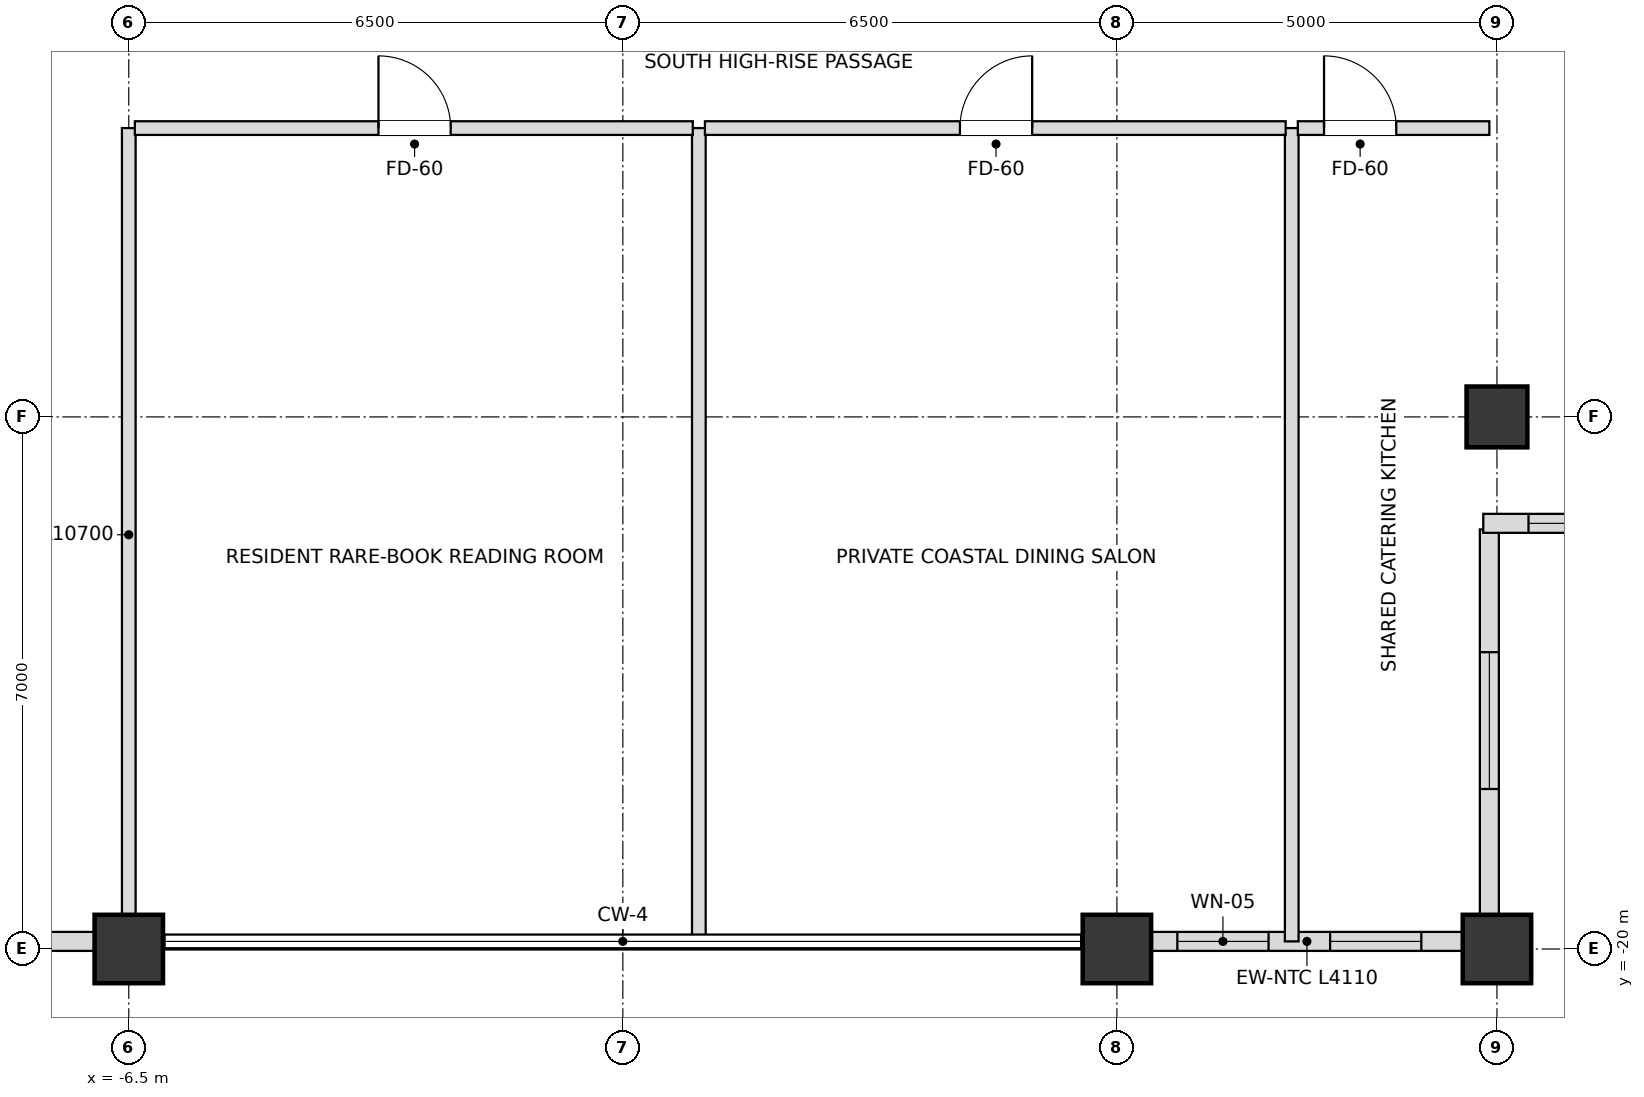
"""IFC4 building model, lengths in metres.
Left out: names, types, materials, properties, quantities, classifications, styles, units other than length and angle.
Written with IfcOpenShell. Run it as: python <this file> out.ifc"""

import sys

from ifc_helpers import new_model, si_unit, direction, frame, frame_2d, origin, origin_2d, place, context, subcontext, project, spatial, rectangle, extrude, element, fill, save


model = new_model("IFC4")
c1 = context("Model", 3, precision=1e-05, world=origin(), true_north=direction((0.0, 1.0)))
c2 = subcontext(c1, "Body", "Model", "MODEL_VIEW")
j1 = project(units=[si_unit("LENGTHUNIT", "METRE"), si_unit("PLANEANGLEUNIT", "RADIAN")], contexts=[c1])
p1 = place(None, origin())
s1 = spatial("IfcSite", under=j1, at=p1, CompositionType="ELEMENT")
p2 = place(p1, origin())
s2 = spatial("IfcBuilding", under=s1, at=p2, CompositionType="ELEMENT")
p3 = place(p2, frame((0.0, 0.0, 269.1)))
s3 = spatial("IfcBuildingStorey", under=s2, at=p3, CompositionType="ELEMENT", Elevation=269.1)
for number, where, z_axis, x_axis in (
    (1, (-6.5, -20.0, 0.0), (0.0, 0.0, 1.0), (1.0, 0.0, 0.0)),
    (2, (6.5, -20.0, 0.0), (0.0, 0.0, 1.0), (1.0, 0.0, 0.0)),
    (3, (11.5, -20.0, 0.0), (0.0, 0.0, 1.0), (1.0, 0.0, 0.0)),
):
    element("IfcColumn", number, at=place(p3, frame(where, z_axis=z_axis, x_axis=x_axis)), inside=s3, PredefinedType="USERDEFINED", context=c2, shape_type="SweptSolid", body=[
        extrude(rectangle(XDim=0.9, YDim=0.9, at=origin_2d()), origin(), (0.0, 0.0, 1.0), 3.6),
    ])
p4 = place(p3, frame((11.5, -13.0, 0.0), z_axis=(0.0, 0.0, 1.0), x_axis=(1.0, 0.0, 0.0)))
e4 = element("IfcColumn", 4, at=p4, inside=s3, PredefinedType="COLUMN", context=c2, shape_type="SweptSolid", body=[
    extrude(rectangle(XDim=0.8, YDim=0.8, at=origin_2d()), origin(), (0.0, 0.0, 1.0), 3.6),
])
p5 = place(p3, frame((-11.055, -19.9, 0.0), z_axis=(0.0, 0.0, 1.0), x_axis=(1.0, 0.0, 0.0)))
e5 = element("IfcWall", 5, at=p5, inside=s3, PredefinedType="SOLIDWALL", context=c2, shape_type="SweptSolid", body=[
    extrude(rectangle(XDim=4.11, YDim=0.25, at=frame_2d((2.055, 0.0))), origin(), (0.0, 0.0, 1.0), 2.748),
])
p6 = place(p5, frame((1.155, 0.0, 0.72)))
e6 = element("IfcOpeningElement", 6, at=p6, cuts=e5, PredefinedType="OPENING", context=c2, shape_type="SweptSolid", body=[
    extrude(rectangle(XDim=1.8, YDim=1.68, at=frame_2d((0.9, 0.84))), frame((0.0, 0.135, 0.0), z_axis=(0.0, -1.0, 0.0), x_axis=(1.0, 0.0, 0.0)), (0.0, 0.0, 1.0), 0.27),
])
p7 = place(p3, frame((6.945, -19.9, 0.0), z_axis=(0.0, 0.0, 1.0), x_axis=(1.0, 0.0, 0.0)))
e7 = element("IfcWall", 7, at=p7, inside=s3, PredefinedType="SOLIDWALL", context=c2, shape_type="SweptSolid", body=[
    extrude(rectangle(XDim=4.11, YDim=0.25, at=frame_2d((2.055, 0.0))), origin(), (0.0, 0.0, 1.0), 2.748),
])
p8 = place(p7, frame((0.35, 0.0, 0.72)))
e8 = element("IfcOpeningElement", 8, at=p8, cuts=e7, PredefinedType="OPENING", context=c2, shape_type="SweptSolid", body=[
    extrude(rectangle(XDim=1.2, YDim=1.68, at=frame_2d((0.6, 0.84))), frame((0.0, 0.135, 0.0), z_axis=(0.0, -1.0, 0.0), x_axis=(1.0, 0.0, 0.0)), (0.0, 0.0, 1.0), 0.27),
])
p9 = place(p7, frame((2.36, 0.0, 0.72)))
e9 = element("IfcOpeningElement", 9, at=p9, cuts=e7, PredefinedType="OPENING", context=c2, shape_type="SweptSolid", body=[
    extrude(rectangle(XDim=1.2, YDim=1.68, at=frame_2d((0.6, 0.84))), frame((0.0, 0.135, 0.0), z_axis=(0.0, -1.0, 0.0), x_axis=(1.0, 0.0, 0.0)), (0.0, 0.0, 1.0), 0.27),
])
p10 = place(p3, frame((11.4, -19.82, 0.0), z_axis=(0.0, 0.0, 1.0), x_axis=(0.0, 1.0, 0.0)))
e10 = element("IfcWall", 10, at=p10, inside=s3, PredefinedType="SOLIDWALL", context=c2, shape_type="SweptSolid", body=[
    extrude(rectangle(XDim=5.34, YDim=0.25, at=frame_2d((2.67, 0.0))), origin(), (0.0, 0.0, 1.0), 2.748),
])
p11 = place(p10, frame((1.925, 0.0, 0.72)))
e11 = element("IfcOpeningElement", 11, at=p11, cuts=e10, PredefinedType="OPENING", context=c2, shape_type="SweptSolid", body=[
    extrude(rectangle(XDim=1.8, YDim=1.68, at=frame_2d((0.9, 0.84))), frame((0.0, 0.135, 0.0), z_axis=(0.0, -1.0, 0.0), x_axis=(1.0, 0.0, 0.0)), (0.0, 0.0, 1.0), 0.27),
])
p12 = place(p3, frame((11.32, -14.4, 0.0), z_axis=(0.0, 0.0, 1.0), x_axis=(1.0, 0.0, 0.0)))
e12 = element("IfcWall", 12, at=p12, inside=s3, PredefinedType="SOLIDWALL", context=c2, shape_type="SweptSolid", body=[
    extrude(rectangle(XDim=5.66, YDim=0.25, at=frame_2d((2.83, 0.0))), origin(), (0.0, 0.0, 1.0), 2.748),
])
p13 = place(p12, frame((0.595, 0.0, 0.72)))
e13 = element("IfcOpeningElement", 13, at=p13, cuts=e12, PredefinedType="OPENING", context=c2, shape_type="SweptSolid", body=[
    extrude(rectangle(XDim=1.8, YDim=1.68, at=frame_2d((0.9, 0.84))), frame((0.0, 0.135, 0.0), z_axis=(0.0, -1.0, 0.0), x_axis=(1.0, 0.0, 0.0)), (0.0, 0.0, 1.0), 0.27),
])
p14 = place(p12, frame((3.265, 0.0, 0.72)))
e14 = element("IfcOpeningElement", 14, at=p14, cuts=e12, PredefinedType="OPENING", context=c2, shape_type="SweptSolid", body=[
    extrude(rectangle(XDim=1.8, YDim=1.68, at=frame_2d((0.9, 0.84))), frame((0.0, 0.135, 0.0), z_axis=(0.0, -1.0, 0.0), x_axis=(1.0, 0.0, 0.0)), (0.0, 0.0, 1.0), 0.27),
])
p15 = place(p3, frame((-6.5, -19.9, 0.0), z_axis=(0.0, 0.0, 1.0), x_axis=(0.0, 1.0, 0.0)))
e15 = element("IfcWall", 15, at=p15, inside=s3, PredefinedType="PARTITIONING", context=c2, shape_type="SweptSolid", body=[
    extrude(rectangle(XDim=10.7, YDim=0.18, at=frame_2d((5.35, 0.0))), origin(), (0.0, 0.0, 1.0), 2.826),
])
p16 = place(p3, frame((1.0, -19.9, 0.0), z_axis=(0.0, 0.0, 1.0), x_axis=(0.0, 1.0, 0.0)))
e16 = element("IfcWall", 16, at=p16, inside=s3, PredefinedType="PARTITIONING", context=c2, shape_type="SweptSolid", body=[
    extrude(rectangle(XDim=10.7, YDim=0.18, at=frame_2d((5.35, 0.0))), origin(), (0.0, 0.0, 1.0), 3.018),
])
p17 = place(p3, frame((8.8, -19.9, 0.0), z_axis=(0.0, 0.0, 1.0), x_axis=(0.0, 1.0, 0.0)))
e17 = element("IfcWall", 17, at=p17, inside=s3, PredefinedType="PARTITIONING", context=c2, shape_type="SweptSolid", body=[
    extrude(rectangle(XDim=10.7, YDim=0.18, at=frame_2d((5.35, 0.0))), origin(), (0.0, 0.0, 1.0), 2.826),
])
p18 = place(p3, frame((-6.42, -9.2, 0.0), z_axis=(0.0, 0.0, 1.0), x_axis=(1.0, 0.0, 0.0)))
e18 = element("IfcWall", 18, at=p18, inside=s3, PredefinedType="PARTITIONING", context=c2, shape_type="SweptSolid", body=[
    extrude(rectangle(XDim=7.34, YDim=0.18, at=frame_2d((3.67, 0.0))), origin(), (0.0, 0.0, 1.0), 3.38),
])
p19 = place(p18, frame((3.205, 0.0, 0.0)))
e19 = element("IfcOpeningElement", 19, at=p19, cuts=e18, PredefinedType="OPENING", context=c2, shape_type="SweptSolid", body=[
    extrude(rectangle(XDim=0.95, YDim=2.15, at=frame_2d((0.475, 1.075))), frame((0.0, 0.1, 0.0), z_axis=(0.0, -1.0, 0.0), x_axis=(1.0, 0.0, 0.0)), (0.0, 0.0, 1.0), 0.2),
])
p20 = place(p3, frame((1.08, -9.2, 0.0), z_axis=(0.0, 0.0, 1.0), x_axis=(1.0, 0.0, 0.0)))
e20 = element("IfcWall", 20, at=p20, inside=s3, PredefinedType="PARTITIONING", context=c2, shape_type="SweptSolid", body=[
    extrude(rectangle(XDim=7.64, YDim=0.18, at=frame_2d((3.82, 0.0))), origin(), (0.0, 0.0, 1.0), 2.826),
])
p21 = place(p20, frame((3.355, 0.0, 0.0)))
e21 = element("IfcOpeningElement", 21, at=p21, cuts=e20, PredefinedType="OPENING", context=c2, shape_type="SweptSolid", body=[
    extrude(rectangle(XDim=0.95, YDim=2.15, at=frame_2d((0.475, 1.075))), frame((0.0, 0.1, 0.0), z_axis=(0.0, -1.0, 0.0), x_axis=(1.0, 0.0, 0.0)), (0.0, 0.0, 1.0), 0.2),
])
p22 = place(p3, frame((8.88, -9.2, 0.0), z_axis=(0.0, 0.0, 1.0), x_axis=(1.0, 0.0, 0.0)))
e22 = element("IfcWall", 22, at=p22, inside=s3, PredefinedType="PARTITIONING", context=c2, shape_type="SweptSolid", body=[
    extrude(rectangle(XDim=2.52, YDim=0.18, at=frame_2d((1.26, 0.0))), origin(), (0.0, 0.0, 1.0), 3.38),
])
p23 = place(p22, frame((0.345, 0.0, 0.0)))
e23 = element("IfcOpeningElement", 23, at=p23, cuts=e22, PredefinedType="OPENING", context=c2, shape_type="SweptSolid", body=[
    extrude(rectangle(XDim=0.95, YDim=2.15, at=frame_2d((0.475, 1.075))), frame((0.0, 0.1, 0.0), z_axis=(0.0, -1.0, 0.0), x_axis=(1.0, 0.0, 0.0)), (0.0, 0.0, 1.0), 0.2),
])
p24 = place(p8, origin())
e24 = element("IfcWindow", 24, at=p24, inside=s3, PartitioningType="SINGLE_PANEL", PredefinedType="WINDOW", context=c2, shape_type="SweptSolid", body=[
    extrude(rectangle(XDim=1.2, YDim=1.68, at=frame_2d((0.6, 0.84))), frame((0.0, 0.03, 0.0), z_axis=(0.0, -1.0, 0.0), x_axis=(1.0, 0.0, 0.0)), (0.0, 0.0, 1.0), 0.06),
])
fill(e8, e24)
p25 = place(p9, origin())
e25 = element("IfcWindow", 25, at=p25, inside=s3, PartitioningType="SINGLE_PANEL", PredefinedType="WINDOW", context=c2, shape_type="SweptSolid", body=[
    extrude(rectangle(XDim=1.2, YDim=1.68, at=frame_2d((0.6, 0.84))), frame((0.0, 0.03, 0.0), z_axis=(0.0, -1.0, 0.0), x_axis=(1.0, 0.0, 0.0)), (0.0, 0.0, 1.0), 0.06),
])
fill(e9, e25)
p26 = place(p11, origin())
e26 = element("IfcWindow", 26, at=p26, inside=s3, PartitioningType="SINGLE_PANEL", PredefinedType="WINDOW", context=c2, shape_type="SweptSolid", body=[
    extrude(rectangle(XDim=1.8, YDim=1.68, at=frame_2d((0.9, 0.84))), frame((0.0, 0.03, 0.0), z_axis=(0.0, -1.0, 0.0), x_axis=(1.0, 0.0, 0.0)), (0.0, 0.0, 1.0), 0.06),
])
fill(e11, e26)
p27 = place(p13, origin())
e27 = element("IfcWindow", 27, at=p27, inside=s3, PartitioningType="SINGLE_PANEL", PredefinedType="WINDOW", context=c2, shape_type="SweptSolid", body=[
    extrude(rectangle(XDim=1.8, YDim=1.68, at=frame_2d((0.9, 0.84))), frame((0.0, 0.03, 0.0), z_axis=(0.0, -1.0, 0.0), x_axis=(1.0, 0.0, 0.0)), (0.0, 0.0, 1.0), 0.06),
])
fill(e13, e27)
p28 = place(p19, origin())
e28 = element("IfcDoor", 28, at=p28, inside=s3, OperationType="SINGLE_SWING_LEFT", PredefinedType="DOOR", context=c2, shape_type="SweptSolid", body=[
    extrude(rectangle(XDim=0.95, YDim=2.15, at=frame_2d((0.475, 1.075))), frame((0.0, 0.025, 0.0), z_axis=(0.0, -1.0, 0.0), x_axis=(1.0, 0.0, 0.0)), (0.0, 0.0, 1.0), 0.05),
])
fill(e19, e28)
p29 = place(p21, origin())
e29 = element("IfcDoor", 29, at=p29, inside=s3, OperationType="SINGLE_SWING_RIGHT", PredefinedType="DOOR", context=c2, shape_type="SweptSolid", body=[
    extrude(rectangle(XDim=0.95, YDim=2.15, at=frame_2d((0.475, 1.075))), frame((0.0, 0.025, 0.0), z_axis=(0.0, -1.0, 0.0), x_axis=(1.0, 0.0, 0.0)), (0.0, 0.0, 1.0), 0.05),
])
fill(e21, e29)
p30 = place(p23, origin())
e30 = element("IfcDoor", 30, at=p30, inside=s3, OperationType="SINGLE_SWING_LEFT", PredefinedType="DOOR", context=c2, shape_type="SweptSolid", body=[
    extrude(rectangle(XDim=0.95, YDim=2.15, at=frame_2d((0.475, 1.075))), frame((0.0, 0.025, 0.0), z_axis=(0.0, -1.0, 0.0), x_axis=(1.0, 0.0, 0.0)), (0.0, 0.0, 1.0), 0.05),
])
fill(e23, e30)
save(model, sys.argv[1])
